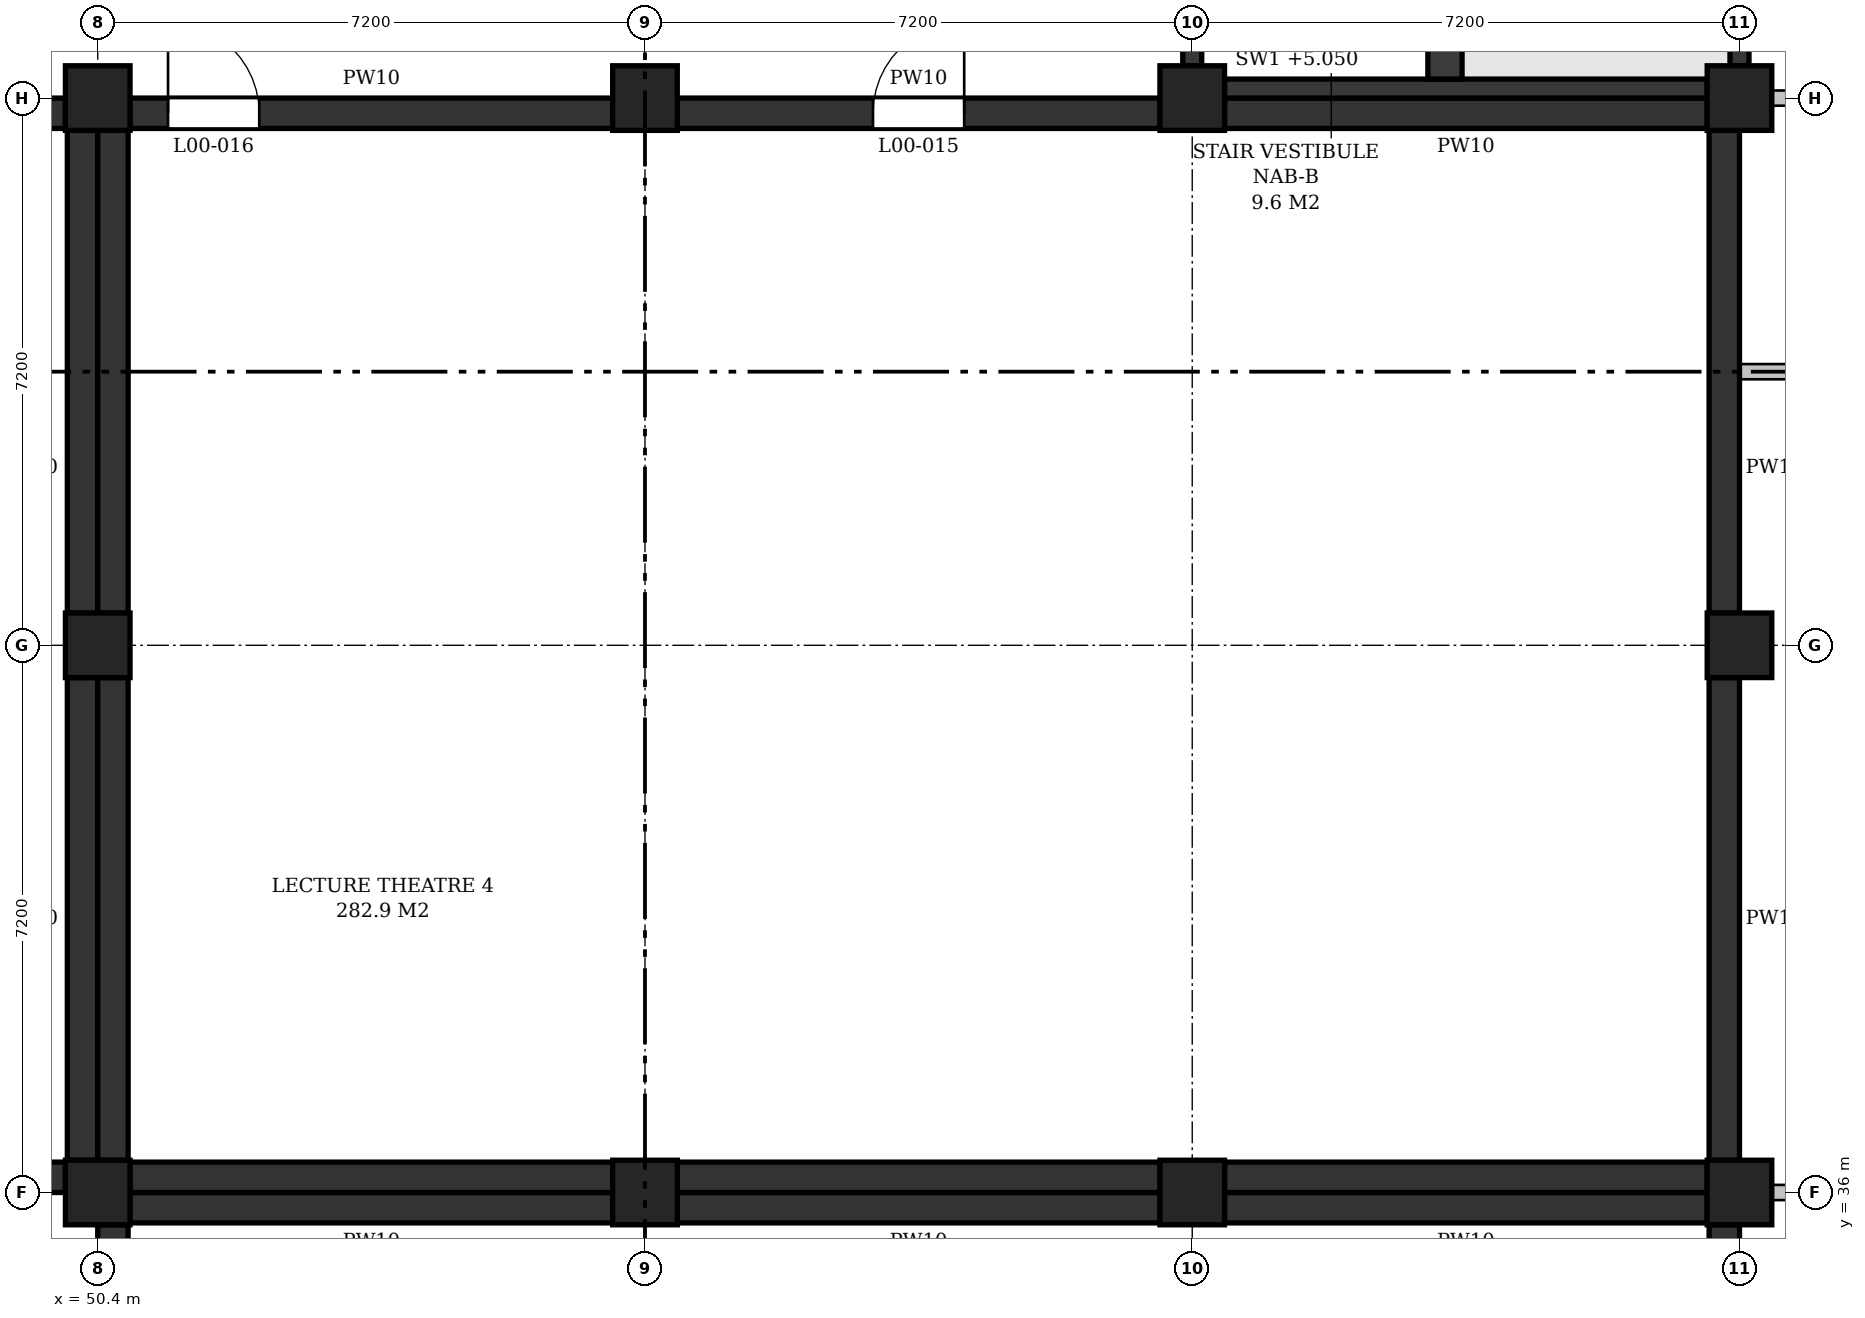
"""IFC4 building model, lengths in metres.
Left out: names, types, materials, properties, quantities, classifications, styles, units other than length and angle.
Written with IfcOpenShell. Run it as: python <this file> out.ifc"""

import sys

from ifc_helpers import new_model, si_unit, direction, frame, frame_2d, origin, origin_2d, place, context, subcontext, project, spatial, polyline, rectangle, outline, extrude, element, fill, save


model = new_model("IFC4")
c1 = context("Model", 3, precision=1e-05, world=origin(), true_north=direction((0.0, 1.0)))
c2 = subcontext(c1, "Body", "Model", "MODEL_VIEW")
j1 = project(units=[si_unit("LENGTHUNIT", "METRE"), si_unit("PLANEANGLEUNIT", "RADIAN")], contexts=[c1])
p1 = place(None, origin())
s1 = spatial("IfcSite", under=j1, at=p1, CompositionType="ELEMENT")
p2 = place(p1, origin())
s2 = spatial("IfcBuilding", under=s1, at=p2, CompositionType="ELEMENT")
p3 = place(p2, origin())
s3 = spatial("IfcBuildingStorey", under=s2, at=p3, CompositionType="ELEMENT", Elevation=0.0)
for number, where, z_axis, x_axis in (
    (1, (50.4, 36.0, 0.0), (0.0, 0.0, 1.0), (1.0, 0.0, 0.0)),
    (2, (50.4, 43.2, 0.0), (0.0, 0.0, 1.0), (1.0, 0.0, 0.0)),
    (3, (50.4, 50.4, 0.0), (0.0, 0.0, 1.0), (1.0, 0.0, 0.0)),
    (4, (57.6, 36.0, 0.0), (0.0, 0.0, 1.0), (1.0, 0.0, 0.0)),
    (5, (57.6, 50.4, 0.0), (0.0, 0.0, 1.0), (1.0, 0.0, 0.0)),
    (6, (64.8, 36.0, 0.0), (0.0, 0.0, 1.0), (1.0, 0.0, 0.0)),
    (7, (64.8, 50.4, 0.0), (0.0, 0.0, 1.0), (1.0, 0.0, 0.0)),
    (8, (72.0, 36.0, 0.0), (0.0, 0.0, 1.0), (1.0, 0.0, 0.0)),
    (9, (72.0, 43.2, 0.0), (0.0, 0.0, 1.0), (1.0, 0.0, 0.0)),
    (10, (72.0, 50.4, 0.0), (0.0, 0.0, 1.0), (1.0, 0.0, 0.0)),
):
    element("IfcColumn", number, at=place(p3, frame(where, z_axis=z_axis, x_axis=x_axis)), inside=s3, PredefinedType="COLUMN", context=c2, shape_type="SweptSolid", body=[
        extrude(rectangle(XDim=0.85, YDim=0.85, at=origin_2d()), origin(), (0.0, 0.0, 1.0), 6.0),
    ])
p4 = place(p3, frame((65.225, 50.525, 0.0), z_axis=(0.0, 0.0, 1.0), x_axis=(1.0, 0.0, 0.0)))
e11 = element("IfcWall", 11, at=p4, inside=s3, PredefinedType="SHEAR", context=c2, shape_type="SweptSolid", body=[
    extrude(rectangle(XDim=6.35, YDim=0.25, at=frame_2d((3.175, 0.0))), origin(), (0.0, 0.0, 1.0), 5.05),
])
p5 = place(p3, frame((72.0, 50.825, 0.0), z_axis=(0.0, 0.0, 1.0), x_axis=(0.0, 1.0, 0.0)))
e12 = element("IfcWall", 12, at=p5, inside=s3, PredefinedType="SHEAR", context=c2, shape_type="SweptSolid", body=[
    extrude(rectangle(XDim=6.35, YDim=0.25, at=frame_2d((3.175, 0.0))), origin(), (0.0, 0.0, 1.0), 5.0),
])
p6 = place(p3, frame((64.8, 50.825, 0.0), z_axis=(0.0, 0.0, 1.0), x_axis=(0.0, 1.0, 0.0)))
e13 = element("IfcWall", 13, at=p6, inside=s3, PredefinedType="SHEAR", context=c2, shape_type="SweptSolid", body=[
    extrude(rectangle(XDim=6.35, YDim=0.25, at=frame_2d((3.175, 0.0))), origin(), (0.0, 0.0, 1.0), 5.0),
])
p7 = place(p6, frame((1.275, 0.0, 0.0)))
e14 = element("IfcOpeningElement", 14, at=p7, cuts=e13, PredefinedType="OPENING", context=c2, shape_type="SweptSolid", body=[
    extrude(rectangle(XDim=1.1, YDim=2.1, at=frame_2d((0.55, 1.05))), frame((0.0, 0.135, 0.0), z_axis=(0.0, -1.0, 0.0), x_axis=(1.0, 0.0, 0.0)), (0.0, 0.0, 1.0), 0.27),
])
p8 = place(p3, frame((68.125, 50.65, 0.0), z_axis=(0.0, 0.0, 1.0), x_axis=(0.0, 1.0, 0.0)))
e15 = element("IfcWall", 15, at=p8, inside=s3, PredefinedType="SHEAR", context=c2, shape_type="SweptSolid", body=[
    extrude(rectangle(XDim=6.8, YDim=0.45, at=frame_2d((3.4, 0.0))), origin(), (0.0, 0.0, 1.0), 5.75),
])
p9 = place(p8, frame((0.4, 0.0, 0.0)))
e16 = element("IfcOpeningElement", 16, at=p9, cuts=e15, PredefinedType="OPENING", context=c2, shape_type="SweptSolid", body=[
    extrude(rectangle(XDim=1.0, YDim=2.1, at=frame_2d((0.5, 1.05))), frame((0.0, 0.235, 0.0), z_axis=(0.0, -1.0, 0.0), x_axis=(1.0, 0.0, 0.0)), (0.0, 0.0, 1.0), 0.47),
])
for number, where, z_axis, x_axis in (
    (17, (50.825, 35.8, 0.0), (0.0, 0.0, 1.0), (1.0, 0.0, 0.0)),
    (18, (58.025, 35.8, 0.0), (0.0, 0.0, 1.0), (1.0, 0.0, 0.0)),
):
    element("IfcWall", number, at=place(p3, frame(where, z_axis=z_axis, x_axis=x_axis)), inside=s3, PredefinedType="SOLIDWALL", context=c2, shape_type="SweptSolid", body=[
        extrude(rectangle(XDim=6.35, YDim=0.4, at=frame_2d((3.175, 0.0))), origin(), (0.0, 0.0, 1.0), 10.7),
    ])
p10 = place(p3, frame((65.225, 35.8, 0.0), z_axis=(0.0, 0.0, 1.0), x_axis=(1.0, 0.0, 0.0)))
e19 = element("IfcWall", 19, at=p10, inside=s3, PredefinedType="SOLIDWALL", context=c2, shape_type="SweptSolid", body=[
    extrude(rectangle(XDim=6.35, YDim=0.4, at=frame_2d((3.175, 0.0))), origin(), (0.0, 0.0, 1.0), 10.7),
])
p11 = place(p3, frame((72.425, 36.0, 0.0), z_axis=(0.0, 0.0, 1.0), x_axis=(1.0, 0.0, 0.0)))
e20 = element("IfcWall", 20, at=p11, inside=s3, PredefinedType="PARTITIONING", context=c2, shape_type="SweptSolid", body=[
    extrude(rectangle(XDim=6.35, YDim=0.2, at=frame_2d((3.175, 0.0))), origin(), (0.0, 0.0, 1.0), 5.0),
])
p12 = place(p3, frame((43.625, 36.2, 0.0), z_axis=(0.0, 0.0, 1.0), x_axis=(1.0, 0.0, 0.0)))
e21 = element("IfcWall", 21, at=p12, inside=s3, PredefinedType="SOLIDWALL", context=c2, shape_type="SweptSolid", body=[
    extrude(rectangle(XDim=6.35, YDim=0.4, at=frame_2d((3.175, 0.0))), origin(), (0.0, 0.0, 1.0), 10.7),
])
p13 = place(p12, frame((2.175, 0.0, 0.0)))
e22 = element("IfcOpeningElement", 22, at=p13, cuts=e21, PredefinedType="OPENING", context=c2, shape_type="SweptSolid", body=[
    extrude(rectangle(XDim=2.0, YDim=2.4, at=frame_2d((1.0, 1.2))), frame((0.0, 0.21, 0.0), z_axis=(0.0, -1.0, 0.0), x_axis=(1.0, 0.0, 0.0)), (0.0, 0.0, 1.0), 0.42),
])
for number, where, z_axis, x_axis in (
    (23, (50.825, 36.2, 0.0), (0.0, 0.0, 1.0), (1.0, 0.0, 0.0)),
    (24, (58.025, 36.2, 0.0), (0.0, 0.0, 1.0), (1.0, 0.0, 0.0)),
):
    element("IfcWall", number, at=place(p3, frame(where, z_axis=z_axis, x_axis=x_axis)), inside=s3, PredefinedType="SOLIDWALL", context=c2, shape_type="SweptSolid", body=[
        extrude(rectangle(XDim=6.35, YDim=0.4, at=frame_2d((3.175, 0.0))), origin(), (0.0, 0.0, 1.0), 10.7),
    ])
p14 = place(p3, frame((65.225, 36.2, 0.0), z_axis=(0.0, 0.0, 1.0), x_axis=(1.0, 0.0, 0.0)))
e25 = element("IfcWall", 25, at=p14, inside=s3, PredefinedType="SOLIDWALL", context=c2, shape_type="SweptSolid", body=[
    extrude(rectangle(XDim=6.35, YDim=0.4, at=frame_2d((3.175, 0.0))), origin(), (0.0, 0.0, 1.0), 10.7),
])
p15 = place(p3, frame((72.0, 46.8, 0.0), z_axis=(0.0, 0.0, 1.0), x_axis=(1.0, 0.0, 0.0)))
e26 = element("IfcWall", 26, at=p15, inside=s3, PredefinedType="PARTITIONING", context=c2, shape_type="SweptSolid", body=[
    extrude(outline(polyline([(0.0, 0.0), (7.3, 0.0), (7.3, 5.0), (6.95, 5.0), (6.95, 5.75), (0.55, 5.75), (0.55, 5.05), (0.0, 5.05), (0.0, 0.0)])), frame((0.0, 0.1, 0.0), z_axis=(0.0, -1.0, 0.0), x_axis=(1.0, 0.0, 0.0)), (0.0, 0.0, 1.0), 0.2),
])
p16 = place(p3, frame((43.625, 50.2, 0.0), z_axis=(0.0, 0.0, 1.0), x_axis=(1.0, 0.0, 0.0)))
e27 = element("IfcWall", 27, at=p16, inside=s3, PredefinedType="SOLIDWALL", context=c2, shape_type="SweptSolid", body=[
    extrude(rectangle(XDim=6.35, YDim=0.4, at=frame_2d((3.175, 0.0))), origin(), (0.0, 0.0, 1.0), 10.7),
])
p17 = place(p16, frame((2.575, 0.0, 0.0)))
e28 = element("IfcOpeningElement", 28, at=p17, cuts=e27, PredefinedType="OPENING", context=c2, shape_type="SweptSolid", body=[
    extrude(rectangle(XDim=1.2, YDim=2.1, at=frame_2d((0.6, 1.05))), frame((0.0, 0.21, 0.0), z_axis=(0.0, -1.0, 0.0), x_axis=(1.0, 0.0, 0.0)), (0.0, 0.0, 1.0), 0.42),
])
p18 = place(p3, frame((50.825, 50.2, 0.0), z_axis=(0.0, 0.0, 1.0), x_axis=(1.0, 0.0, 0.0)))
e29 = element("IfcWall", 29, at=p18, inside=s3, PredefinedType="SOLIDWALL", context=c2, shape_type="SweptSolid", body=[
    extrude(rectangle(XDim=6.35, YDim=0.4, at=frame_2d((3.175, 0.0))), origin(), (0.0, 0.0, 1.0), 10.7),
])
p19 = place(p18, frame((0.5, 0.0, 0.0)))
e30 = element("IfcOpeningElement", 30, at=p19, cuts=e29, PredefinedType="OPENING", context=c2, shape_type="SweptSolid", body=[
    extrude(rectangle(XDim=1.2, YDim=2.1, at=frame_2d((0.6, 1.05))), frame((0.0, 0.21, 0.0), z_axis=(0.0, -1.0, 0.0), x_axis=(1.0, 0.0, 0.0)), (0.0, 0.0, 1.0), 0.42),
])
p20 = place(p3, frame((58.025, 50.2, 0.0), z_axis=(0.0, 0.0, 1.0), x_axis=(1.0, 0.0, 0.0)))
e31 = element("IfcWall", 31, at=p20, inside=s3, PredefinedType="SOLIDWALL", context=c2, shape_type="SweptSolid", body=[
    extrude(rectangle(XDim=6.35, YDim=0.4, at=frame_2d((3.175, 0.0))), origin(), (0.0, 0.0, 1.0), 10.7),
])
p21 = place(p20, frame((2.575, 0.0, 0.0)))
e32 = element("IfcOpeningElement", 32, at=p21, cuts=e31, PredefinedType="OPENING", context=c2, shape_type="SweptSolid", body=[
    extrude(rectangle(XDim=1.2, YDim=2.1, at=frame_2d((0.6, 1.05))), frame((0.0, 0.21, 0.0), z_axis=(0.0, -1.0, 0.0), x_axis=(1.0, 0.0, 0.0)), (0.0, 0.0, 1.0), 0.42),
])
p22 = place(p3, frame((65.225, 50.2, 0.0), z_axis=(0.0, 0.0, 1.0), x_axis=(1.0, 0.0, 0.0)))
e33 = element("IfcWall", 33, at=p22, inside=s3, PredefinedType="SOLIDWALL", context=c2, shape_type="SweptSolid", body=[
    extrude(rectangle(XDim=6.35, YDim=0.4, at=frame_2d((3.175, 0.0))), origin(), (0.0, 0.0, 1.0), 10.7),
])
p23 = place(p3, frame((72.425, 50.4, 0.0), z_axis=(0.0, 0.0, 1.0), x_axis=(1.0, 0.0, 0.0)))
e34 = element("IfcWall", 34, at=p23, inside=s3, PredefinedType="PARTITIONING", context=c2, shape_type="SweptSolid", body=[
    extrude(rectangle(XDim=6.35, YDim=0.2, at=frame_2d((3.175, 0.0))), origin(), (0.0, 0.0, 1.0), 5.0),
])
p24 = place(p23, frame((2.675, 0.0, 0.0)))
e35 = element("IfcOpeningElement", 35, at=p24, cuts=e34, PredefinedType="OPENING", context=c2, shape_type="SweptSolid", body=[
    extrude(rectangle(XDim=1.0, YDim=2.1, at=frame_2d((0.5, 1.05))), frame((0.0, 0.11, 0.0), z_axis=(0.0, -1.0, 0.0), x_axis=(1.0, 0.0, 0.0)), (0.0, 0.0, 1.0), 0.22),
])
p25 = place(p3, frame((50.2, 36.425, 0.0), z_axis=(0.0, 0.0, 1.0), x_axis=(0.0, 1.0, 0.0)))
e36 = element("IfcWall", 36, at=p25, inside=s3, PredefinedType="SOLIDWALL", context=c2, shape_type="SweptSolid", body=[
    extrude(rectangle(XDim=6.35, YDim=0.4, at=frame_2d((3.175, 0.0))), origin(), (0.0, 0.0, 1.0), 10.7),
])
p26 = place(p3, frame((50.2, 43.625, 0.0), z_axis=(0.0, 0.0, 1.0), x_axis=(0.0, 1.0, 0.0)))
e37 = element("IfcWall", 37, at=p26, inside=s3, PredefinedType="SOLIDWALL", context=c2, shape_type="SweptSolid", body=[
    extrude(rectangle(XDim=6.35, YDim=0.4, at=frame_2d((3.175, 0.0))), origin(), (0.0, 0.0, 1.0), 10.7),
])
p27 = place(p3, frame((50.6, 29.225, 0.0), z_axis=(0.0, 0.0, 1.0), x_axis=(0.0, 1.0, 0.0)))
e38 = element("IfcWall", 38, at=p27, inside=s3, PredefinedType="SOLIDWALL", context=c2, shape_type="SweptSolid", body=[
    extrude(rectangle(XDim=6.35, YDim=0.4, at=frame_2d((3.175, 0.0))), origin(), (0.0, 0.0, 1.0), 10.7),
])
p28 = place(p27, frame((3.85, 0.0, 0.0)))
e39 = element("IfcOpeningElement", 39, at=p28, cuts=e38, PredefinedType="OPENING", context=c2, shape_type="SweptSolid", body=[
    extrude(rectangle(XDim=2.0, YDim=2.4, at=frame_2d((1.0, 1.2))), frame((0.0, 0.21, 0.0), z_axis=(0.0, -1.0, 0.0), x_axis=(1.0, 0.0, 0.0)), (0.0, 0.0, 1.0), 0.42),
])
p29 = place(p27, frame((0.5, 0.0, 0.0)))
e40 = element("IfcOpeningElement", 40, at=p29, cuts=e38, PredefinedType="OPENING", context=c2, shape_type="SweptSolid", body=[
    extrude(rectangle(XDim=2.0, YDim=2.4, at=frame_2d((1.0, 1.2))), frame((0.0, 0.21, 0.0), z_axis=(0.0, -1.0, 0.0), x_axis=(1.0, 0.0, 0.0)), (0.0, 0.0, 1.0), 0.42),
])
p30 = place(p3, frame((50.6, 36.425, 0.0), z_axis=(0.0, 0.0, 1.0), x_axis=(0.0, 1.0, 0.0)))
e41 = element("IfcWall", 41, at=p30, inside=s3, PredefinedType="SOLIDWALL", context=c2, shape_type="SweptSolid", body=[
    extrude(rectangle(XDim=6.35, YDim=0.4, at=frame_2d((3.175, 0.0))), origin(), (0.0, 0.0, 1.0), 10.7),
])
p31 = place(p3, frame((50.6, 43.625, 0.0), z_axis=(0.0, 0.0, 1.0), x_axis=(0.0, 1.0, 0.0)))
e42 = element("IfcWall", 42, at=p31, inside=s3, PredefinedType="SOLIDWALL", context=c2, shape_type="SweptSolid", body=[
    extrude(rectangle(XDim=6.35, YDim=0.4, at=frame_2d((3.175, 0.0))), origin(), (0.0, 0.0, 1.0), 10.7),
])
p32 = place(p3, frame((71.8, 29.225, 0.0), z_axis=(0.0, 0.0, 1.0), x_axis=(0.0, 1.0, 0.0)))
e43 = element("IfcWall", 43, at=p32, inside=s3, PredefinedType="SOLIDWALL", context=c2, shape_type="SweptSolid", body=[
    extrude(rectangle(XDim=6.35, YDim=0.4, at=frame_2d((3.175, 0.0))), origin(), (0.0, 0.0, 1.0), 10.55),
])
p33 = place(p32, frame((2.575, 0.0, 0.0)))
e44 = element("IfcOpeningElement", 44, at=p33, cuts=e43, PredefinedType="OPENING", context=c2, shape_type="SweptSolid", body=[
    extrude(rectangle(XDim=1.2, YDim=2.1, at=frame_2d((0.6, 1.05))), frame((0.0, 0.21, 0.0), z_axis=(0.0, -1.0, 0.0), x_axis=(1.0, 0.0, 0.0)), (0.0, 0.0, 1.0), 0.42),
])
p34 = place(p32, frame((4.65, 0.0, 0.0)))
e45 = element("IfcOpeningElement", 45, at=p34, cuts=e43, PredefinedType="OPENING", context=c2, shape_type="SweptSolid", body=[
    extrude(rectangle(XDim=1.2, YDim=2.1, at=frame_2d((0.6, 1.05))), frame((0.0, 0.21, 0.0), z_axis=(0.0, -1.0, 0.0), x_axis=(1.0, 0.0, 0.0)), (0.0, 0.0, 1.0), 0.42),
])
p35 = place(p3, frame((71.8, 36.425, 0.0), z_axis=(0.0, 0.0, 1.0), x_axis=(0.0, 1.0, 0.0)))
e46 = element("IfcWall", 46, at=p35, inside=s3, PredefinedType="SOLIDWALL", context=c2, shape_type="SweptSolid", body=[
    extrude(rectangle(XDim=6.35, YDim=0.4, at=frame_2d((3.175, 0.0))), origin(), (0.0, 0.0, 1.0), 10.55),
])
p36 = place(p3, frame((71.8, 43.625, 0.0), z_axis=(0.0, 0.0, 1.0), x_axis=(0.0, 1.0, 0.0)))
e47 = element("IfcWall", 47, at=p36, inside=s3, PredefinedType="SOLIDWALL", context=c2, shape_type="SweptSolid", body=[
    extrude(rectangle(XDim=6.35, YDim=0.4, at=frame_2d((3.175, 0.0))), origin(), (0.0, 0.0, 1.0), 10.55),
])
p37 = place(p21, origin())
e48 = element("IfcDoor", 48, at=p37, inside=s3, OperationType="SINGLE_SWING_RIGHT", PredefinedType="DOOR", context=c2, shape_type="SweptSolid", body=[
    extrude(rectangle(XDim=1.2, YDim=2.1, at=frame_2d((0.6, 1.05))), frame((0.0, 0.025, 0.0), z_axis=(0.0, -1.0, 0.0), x_axis=(1.0, 0.0, 0.0)), (0.0, 0.0, 1.0), 0.05),
])
fill(e32, e48)
p38 = place(p19, origin())
e49 = element("IfcDoor", 49, at=p38, inside=s3, OperationType="SINGLE_SWING_LEFT", PredefinedType="DOOR", context=c2, shape_type="SweptSolid", body=[
    extrude(rectangle(XDim=1.2, YDim=2.1, at=frame_2d((0.6, 1.05))), frame((0.0, 0.025, 0.0), z_axis=(0.0, -1.0, 0.0), x_axis=(1.0, 0.0, 0.0)), (0.0, 0.0, 1.0), 0.05),
])
fill(e30, e49)
save(model, sys.argv[1])
